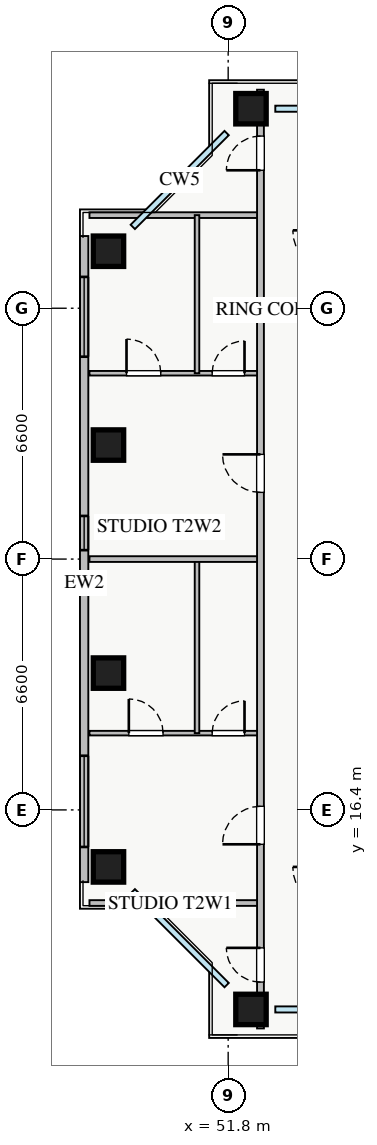
"""IFC4 building model, lengths in metres.
Left out: names, types, materials, properties, quantities, classifications, styles, units other than length and angle.
Written with IfcOpenShell. Run it as: python <this file> out.ifc"""

import sys

from ifc_helpers import new_model, si_unit, direction, frame, frame_2d, origin, origin_2d, place, context, subcontext, project, spatial, rectangle, extrude, source, transform, mapped, element, fill, save


model = new_model("IFC4")
c1 = context("Model", 3, precision=1e-05, world=origin(), true_north=direction((0.0, 1.0)))
c2 = subcontext(c1, "Body", "Model", "MODEL_VIEW")
j1 = project(units=[si_unit("LENGTHUNIT", "METRE"), si_unit("PLANEANGLEUNIT", "RADIAN")], contexts=[c1])
p1 = place(None, origin())
s1 = spatial("IfcSite", under=j1, at=p1, CompositionType="ELEMENT")
p2 = place(p1, origin())
s2 = spatial("IfcBuilding", under=s1, at=p2, CompositionType="ELEMENT")
p3 = place(p2, frame((0.0, 0.0, 89.25)))
s3 = spatial("IfcBuildingStorey", under=s2, at=p3, CompositionType="ELEMENT", Elevation=89.25)
m1 = source(origin(), c2, "Body", "SweptSolid", [
    extrude(rectangle(XDim=0.8, YDim=0.8, at=origin_2d()), origin(), (0.0, 0.0, 1.0), 3.25),
])
for number, where, z_axis, x_axis in (
    (1, (52.4, 11.15, 0.0), (0.0, 0.0, 1.0), (1.0, 0.0, 0.0)),
    (2, (52.4, 34.85, 0.0), (0.0, 0.0, 1.0), (1.0, 0.0, 0.0)),
    (3, (48.65, 14.9, 0.0), (0.0, 0.0, 1.0), (1.0, 0.0, 0.0)),
    (4, (48.65, 20.0, 0.0), (0.0, 0.0, 1.0), (1.0, 0.0, 0.0)),
    (5, (48.65, 26.0, 0.0), (0.0, 0.0, 1.0), (1.0, 0.0, 0.0)),
    (6, (48.65, 31.1, 0.0), (0.0, 0.0, 1.0), (1.0, 0.0, 0.0)),
):
    element("IfcColumn", number, at=place(p3, frame(where, z_axis=z_axis, x_axis=x_axis)), inside=s3, PredefinedType="COLUMN", context=c2, shape_type="MappedRepresentation", body=[
        mapped(m1, transform((0.0, 0.0, 0.0), x_axis=(1.0, 0.0, 0.0), y_axis=(0.0, 1.0, 0.0), z_axis=(0.0, 0.0, 1.0), scale=1.0)),
    ])
p4 = place(p3, frame((48.01, 14.5, 0.0), z_axis=(0.0, 0.0, 1.0), x_axis=(0.0, 1.0, 0.0)))
e7 = element("IfcWall", 7, at=p4, inside=s3, PredefinedType="STANDARD", context=c2, shape_type="SweptSolid", body=[
    extrude(rectangle(XDim=17.0, YDim=0.22, at=frame_2d((8.5, 0.0))), origin(), (0.0, 0.0, 1.0), 2.57),
])
p5 = place(p4, frame((0.925, 0.0, 0.9)))
e8 = element("IfcOpeningElement", 8, at=p5, cuts=e7, PredefinedType="OPENING", context=c2, shape_type="SweptSolid", body=[
    extrude(rectangle(XDim=2.4, YDim=1.48, at=frame_2d((1.2, 0.74))), frame((0.0, 0.12, 0.0), z_axis=(0.0, -1.0, 0.0), x_axis=(1.0, 0.0, 0.0)), (0.0, 0.0, 1.0), 0.24),
])
p6 = place(p4, frame((13.825, 0.0, 0.9)))
e9 = element("IfcOpeningElement", 9, at=p6, cuts=e7, PredefinedType="OPENING", context=c2, shape_type="SweptSolid", body=[
    extrude(rectangle(XDim=2.1, YDim=1.48, at=frame_2d((1.05, 0.74))), frame((0.0, 0.12, 0.0), z_axis=(0.0, -1.0, 0.0), x_axis=(1.0, 0.0, 0.0)), (0.0, 0.0, 1.0), 0.24),
])
p7 = place(p4, frame((8.735, 0.0, 0.9)))
e10 = element("IfcOpeningElement", 10, at=p7, cuts=e7, PredefinedType="OPENING", context=c2, shape_type="SweptSolid", body=[
    extrude(rectangle(XDim=0.9, YDim=1.2, at=frame_2d((0.45, 0.6))), frame((0.0, 0.12, 0.0), z_axis=(0.0, -1.0, 0.0), x_axis=(1.0, 0.0, 0.0)), (0.0, 0.0, 1.0), 0.24),
])
for number, where, z_axis, x_axis in (
    (11, (48.15, 32.05, 0.0), (0.0, 0.0, 1.0), (1.0, 0.0, 0.0)),
    (12, (48.15, 13.95, 0.0), (0.0, 0.0, 1.0), (1.0, 0.0, 0.0)),
):
    element("IfcWall", number, at=place(p3, frame(where, z_axis=z_axis, x_axis=x_axis)), inside=s3, PredefinedType="PARTITIONING", context=c2, shape_type="SweptSolid", body=[
        extrude(rectangle(XDim=4.5, YDim=0.15, at=frame_2d((2.25, 0.0))), origin(), (0.0, 0.0, 1.0), 3.03),
    ])
p8 = place(p3, frame((48.15, 18.42, 0.0), z_axis=(0.0, 0.0, 1.0), x_axis=(1.0, 0.0, 0.0)))
e13 = element("IfcWall", 13, at=p8, inside=s3, PredefinedType="PLUMBINGWALL", context=c2, shape_type="SweptSolid", body=[
    extrude(rectangle(XDim=4.5, YDim=0.12, at=frame_2d((2.25, 0.0))), origin(), (0.0, 0.0, 1.0), 2.781),
])
p9 = place(p8, frame((1.036, 0.0, 0.0)))
e14 = element("IfcOpeningElement", 14, at=p9, cuts=e13, PredefinedType="OPENING", context=c2, shape_type="SweptSolid", body=[
    extrude(rectangle(XDim=0.9, YDim=2.05, at=frame_2d((0.45, 1.025))), frame((0.0, 0.07, 0.0), z_axis=(0.0, -1.0, 0.0), x_axis=(1.0, 0.0, 0.0)), (0.0, 0.0, 1.0), 0.14),
])
p10 = place(p8, frame((3.23, 0.0, 0.0)))
e15 = element("IfcOpeningElement", 15, at=p10, cuts=e13, PredefinedType="OPENING", context=c2, shape_type="SweptSolid", body=[
    extrude(rectangle(XDim=0.85, YDim=2.05, at=frame_2d((0.425, 1.025))), frame((0.0, 0.07, 0.0), z_axis=(0.0, -1.0, 0.0), x_axis=(1.0, 0.0, 0.0)), (0.0, 0.0, 1.0), 0.14),
])
p11 = place(p3, frame((50.98, 18.42, 0.0), z_axis=(0.0, 0.0, 1.0), x_axis=(0.0, 1.0, 0.0)))
e16 = element("IfcWall", 16, at=p11, inside=s3, PredefinedType="PLUMBINGWALL", context=c2, shape_type="SweptSolid", body=[
    extrude(rectangle(XDim=4.58, YDim=0.12, at=frame_2d((2.29, 0.0))), origin(), (0.0, 0.0, 1.0), 3.03),
])
p12 = place(p3, frame((48.15, 27.89, 0.0), z_axis=(0.0, 0.0, 1.0), x_axis=(1.0, 0.0, 0.0)))
e17 = element("IfcWall", 17, at=p12, inside=s3, PredefinedType="PLUMBINGWALL", context=c2, shape_type="SweptSolid", body=[
    extrude(rectangle(XDim=4.5, YDim=0.12, at=frame_2d((2.25, 0.0))), origin(), (0.0, 0.0, 1.0), 3.03),
])
p13 = place(p12, frame((0.975, 0.0, 0.0)))
e18 = element("IfcOpeningElement", 18, at=p13, cuts=e17, PredefinedType="OPENING", context=c2, shape_type="SweptSolid", body=[
    extrude(rectangle(XDim=0.9, YDim=2.05, at=frame_2d((0.45, 1.025))), frame((0.0, 0.07, 0.0), z_axis=(0.0, -1.0, 0.0), x_axis=(1.0, 0.0, 0.0)), (0.0, 0.0, 1.0), 0.14),
])
p14 = place(p12, frame((3.23, 0.0, 0.0)))
e19 = element("IfcOpeningElement", 19, at=p14, cuts=e17, PredefinedType="OPENING", context=c2, shape_type="SweptSolid", body=[
    extrude(rectangle(XDim=0.85, YDim=2.05, at=frame_2d((0.425, 1.025))), frame((0.0, 0.07, 0.0), z_axis=(0.0, -1.0, 0.0), x_axis=(1.0, 0.0, 0.0)), (0.0, 0.0, 1.0), 0.14),
])
p15 = place(p3, frame((50.98, 27.89, 0.0), z_axis=(0.0, 0.0, 1.0), x_axis=(0.0, 1.0, 0.0)))
e20 = element("IfcWall", 20, at=p15, inside=s3, PredefinedType="PLUMBINGWALL", context=c2, shape_type="SweptSolid", body=[
    extrude(rectangle(XDim=4.16, YDim=0.12, at=frame_2d((2.08, 0.0))), origin(), (0.0, 0.0, 1.0), 3.03),
])
p16 = place(p3, frame((48.15, 23.0, 0.0), z_axis=(0.0, 0.0, 1.0), x_axis=(1.0, 0.0, 0.0)))
e21 = element("IfcWall", 21, at=p16, inside=s3, PredefinedType="PARTITIONING", context=c2, shape_type="SweptSolid", body=[
    extrude(rectangle(XDim=4.5, YDim=0.15, at=frame_2d((2.25, 0.0))), origin(), (0.0, 0.0, 1.0), 2.781),
])
p17 = place(p3, frame((52.65, 10.65, 0.0), z_axis=(0.0, 0.0, 1.0), x_axis=(0.0, 1.0, 0.0)))
e22 = element("IfcWall", 22, at=p17, inside=s3, PredefinedType="PARTITIONING", context=c2, shape_type="SweptSolid", body=[
    extrude(rectangle(XDim=24.7, YDim=0.18, at=frame_2d((12.35, 0.0))), origin(), (0.0, 0.0, 1.0), 2.575),
])
p18 = place(p17, frame((22.58, 0.0, 0.0)))
e23 = element("IfcOpeningElement", 23, at=p18, cuts=e22, PredefinedType="OPENING", context=c2, shape_type="SweptSolid", body=[
    extrude(rectangle(XDim=0.9, YDim=2.05, at=frame_2d((0.45, 1.025))), frame((0.0, 0.1, 0.0), z_axis=(0.0, -1.0, 0.0), x_axis=(1.0, 0.0, 0.0)), (0.0, 0.0, 1.0), 0.2),
])
p19 = place(p17, frame((1.22, 0.0, 0.0)))
e24 = element("IfcOpeningElement", 24, at=p19, cuts=e22, PredefinedType="OPENING", context=c2, shape_type="SweptSolid", body=[
    extrude(rectangle(XDim=0.9, YDim=2.05, at=frame_2d((0.45, 1.025))), frame((0.0, 0.1, 0.0), z_axis=(0.0, -1.0, 0.0), x_axis=(1.0, 0.0, 0.0)), (0.0, 0.0, 1.0), 0.2),
])
p20 = place(p17, frame((4.845, 0.0, 0.0)))
e25 = element("IfcOpeningElement", 25, at=p20, cuts=e22, PredefinedType="OPENING", context=c2, shape_type="SweptSolid", body=[
    extrude(rectangle(XDim=1.0, YDim=2.05, at=frame_2d((0.5, 1.025))), frame((0.0, 0.1, 0.0), z_axis=(0.0, -1.0, 0.0), x_axis=(1.0, 0.0, 0.0)), (0.0, 0.0, 1.0), 0.2),
])
p21 = place(p17, frame((14.105, 0.0, 0.0)))
e26 = element("IfcOpeningElement", 26, at=p21, cuts=e22, PredefinedType="OPENING", context=c2, shape_type="SweptSolid", body=[
    extrude(rectangle(XDim=1.0, YDim=2.05, at=frame_2d((0.5, 1.025))), frame((0.0, 0.1, 0.0), z_axis=(0.0, -1.0, 0.0), x_axis=(1.0, 0.0, 0.0)), (0.0, 0.0, 1.0), 0.2),
])
m2 = source(origin(), c2, "Body", "SweptSolid", [
    extrude(rectangle(XDim=2.4, YDim=1.48, at=frame_2d((1.2, 0.74))), frame((0.0, 0.03, 0.0), z_axis=(0.0, -1.0, 0.0), x_axis=(1.0, 0.0, 0.0)), (0.0, 0.0, 1.0), 0.06),
])
p22 = place(p5, origin())
e27 = element("IfcWindow", 27, at=p22, inside=s3, PartitioningType="TRIPLE_PANEL_VERTICAL", PredefinedType="WINDOW", context=c2, shape_type="MappedRepresentation", body=[
    mapped(m2, transform((0.0, 0.0, 0.0), x_axis=(1.0, 0.0, 0.0), y_axis=(0.0, 1.0, 0.0), z_axis=(0.0, 0.0, 1.0), scale=1.0)),
])
fill(e8, e27)
m3 = source(origin(), c2, "Body", "SweptSolid", [
    extrude(rectangle(XDim=2.1, YDim=1.48, at=frame_2d((1.05, 0.74))), frame((0.0, 0.03, 0.0), z_axis=(0.0, -1.0, 0.0), x_axis=(1.0, 0.0, 0.0)), (0.0, 0.0, 1.0), 0.06),
])
p23 = place(p6, origin())
e28 = element("IfcWindow", 28, at=p23, inside=s3, PartitioningType="TRIPLE_PANEL_VERTICAL", PredefinedType="WINDOW", context=c2, shape_type="MappedRepresentation", body=[
    mapped(m3, transform((0.0, 0.0, 0.0), x_axis=(1.0, 0.0, 0.0), y_axis=(0.0, 1.0, 0.0), z_axis=(0.0, 0.0, 1.0), scale=1.0)),
])
fill(e9, e28)
m4 = source(origin(), c2, "Body", "SweptSolid", [
    extrude(rectangle(XDim=0.9, YDim=2.05, at=frame_2d((0.45, 1.025))), frame((0.0, 0.025, 0.0), z_axis=(0.0, -1.0, 0.0), x_axis=(1.0, 0.0, 0.0)), (0.0, 0.0, 1.0), 0.05),
])
p24 = place(p9, origin())
e29 = element("IfcDoor", 29, at=p24, inside=s3, OperationType="SINGLE_SWING_LEFT", PredefinedType="DOOR", context=c2, shape_type="MappedRepresentation", body=[
    mapped(m4, transform((0.0, 0.0, 0.0), x_axis=(1.0, 0.0, 0.0), y_axis=(0.0, 1.0, 0.0), z_axis=(0.0, 0.0, 1.0), scale=1.0)),
])
fill(e14, e29)
m5 = source(origin(), c2, "Body", "SweptSolid", [
    extrude(rectangle(XDim=0.85, YDim=2.05, at=frame_2d((0.425, 1.025))), frame((0.0, 0.025, 0.0), z_axis=(0.0, -1.0, 0.0), x_axis=(1.0, 0.0, 0.0)), (0.0, 0.0, 1.0), 0.05),
])
p25 = place(p10, origin())
e30 = element("IfcDoor", 30, at=p25, inside=s3, OperationType="SINGLE_SWING_RIGHT", PredefinedType="DOOR", context=c2, shape_type="MappedRepresentation", body=[
    mapped(m5, transform((0.0, 0.0, 0.0), x_axis=(1.0, 0.0, 0.0), y_axis=(0.0, 1.0, 0.0), z_axis=(0.0, 0.0, 1.0), scale=1.0)),
])
fill(e15, e30)
p26 = place(p13, origin())
e31 = element("IfcDoor", 31, at=p26, inside=s3, OperationType="SINGLE_SWING_LEFT", PredefinedType="DOOR", context=c2, shape_type="MappedRepresentation", body=[
    mapped(m4, transform((0.0, 0.0, 0.0), x_axis=(1.0, 0.0, 0.0), y_axis=(0.0, 1.0, 0.0), z_axis=(0.0, 0.0, 1.0), scale=1.0)),
])
fill(e18, e31)
p27 = place(p14, origin())
e32 = element("IfcDoor", 32, at=p27, inside=s3, OperationType="SINGLE_SWING_RIGHT", PredefinedType="DOOR", context=c2, shape_type="MappedRepresentation", body=[
    mapped(m5, transform((0.0, 0.0, 0.0), x_axis=(1.0, 0.0, 0.0), y_axis=(0.0, 1.0, 0.0), z_axis=(0.0, 0.0, 1.0), scale=1.0)),
])
fill(e19, e32)
p28 = place(p18, origin())
e33 = element("IfcDoor", 33, at=p28, inside=s3, OperationType="SINGLE_SWING_LEFT", PredefinedType="DOOR", context=c2, shape_type="MappedRepresentation", body=[
    mapped(m4, transform((0.0, 0.0, 0.0), x_axis=(1.0, 0.0, 0.0), y_axis=(0.0, 1.0, 0.0), z_axis=(0.0, 0.0, 1.0), scale=1.0)),
])
fill(e23, e33)
p29 = place(p19, origin())
e34 = element("IfcDoor", 34, at=p29, inside=s3, OperationType="SINGLE_SWING_RIGHT", PredefinedType="DOOR", context=c2, shape_type="MappedRepresentation", body=[
    mapped(m4, transform((0.0, 0.0, 0.0), x_axis=(1.0, 0.0, 0.0), y_axis=(0.0, 1.0, 0.0), z_axis=(0.0, 0.0, 1.0), scale=1.0)),
])
fill(e24, e34)
m6 = source(origin(), c2, "Body", "SweptSolid", [
    extrude(rectangle(XDim=1.0, YDim=2.05, at=frame_2d((0.5, 1.025))), frame((0.0, 0.025, 0.0), z_axis=(0.0, -1.0, 0.0), x_axis=(1.0, 0.0, 0.0)), (0.0, 0.0, 1.0), 0.05),
])
p30 = place(p20, origin())
e35 = element("IfcDoor", 35, at=p30, inside=s3, OperationType="SINGLE_SWING_LEFT", PredefinedType="DOOR", context=c2, shape_type="MappedRepresentation", body=[
    mapped(m6, transform((0.0, 0.0, 0.0), x_axis=(1.0, 0.0, 0.0), y_axis=(0.0, 1.0, 0.0), z_axis=(0.0, 0.0, 1.0), scale=1.0)),
])
fill(e25, e35)
p31 = place(p21, origin())
e36 = element("IfcDoor", 36, at=p31, inside=s3, OperationType="SINGLE_SWING_RIGHT", PredefinedType="DOOR", context=c2, shape_type="MappedRepresentation", body=[
    mapped(m6, transform((0.0, 0.0, 0.0), x_axis=(1.0, 0.0, 0.0), y_axis=(0.0, 1.0, 0.0), z_axis=(0.0, 0.0, 1.0), scale=1.0)),
])
fill(e26, e36)
m7 = source(origin(), c2, "Body", "SweptSolid", [
    extrude(rectangle(XDim=0.9, YDim=1.2, at=frame_2d((0.45, 0.6))), frame((0.0, 0.03, 0.0), z_axis=(0.0, -1.0, 0.0), x_axis=(1.0, 0.0, 0.0)), (0.0, 0.0, 1.0), 0.06),
])
p32 = place(p7, origin())
e37 = element("IfcWindow", 37, at=p32, inside=s3, PartitioningType="SINGLE_PANEL", PredefinedType="WINDOW", context=c2, shape_type="MappedRepresentation", body=[
    mapped(m7, transform((0.0, 0.0, 0.0), x_axis=(1.0, 0.0, 0.0), y_axis=(0.0, 1.0, 0.0), z_axis=(0.0, 0.0, 1.0), scale=1.0)),
])
fill(e10, e37)
save(model, sys.argv[1])
